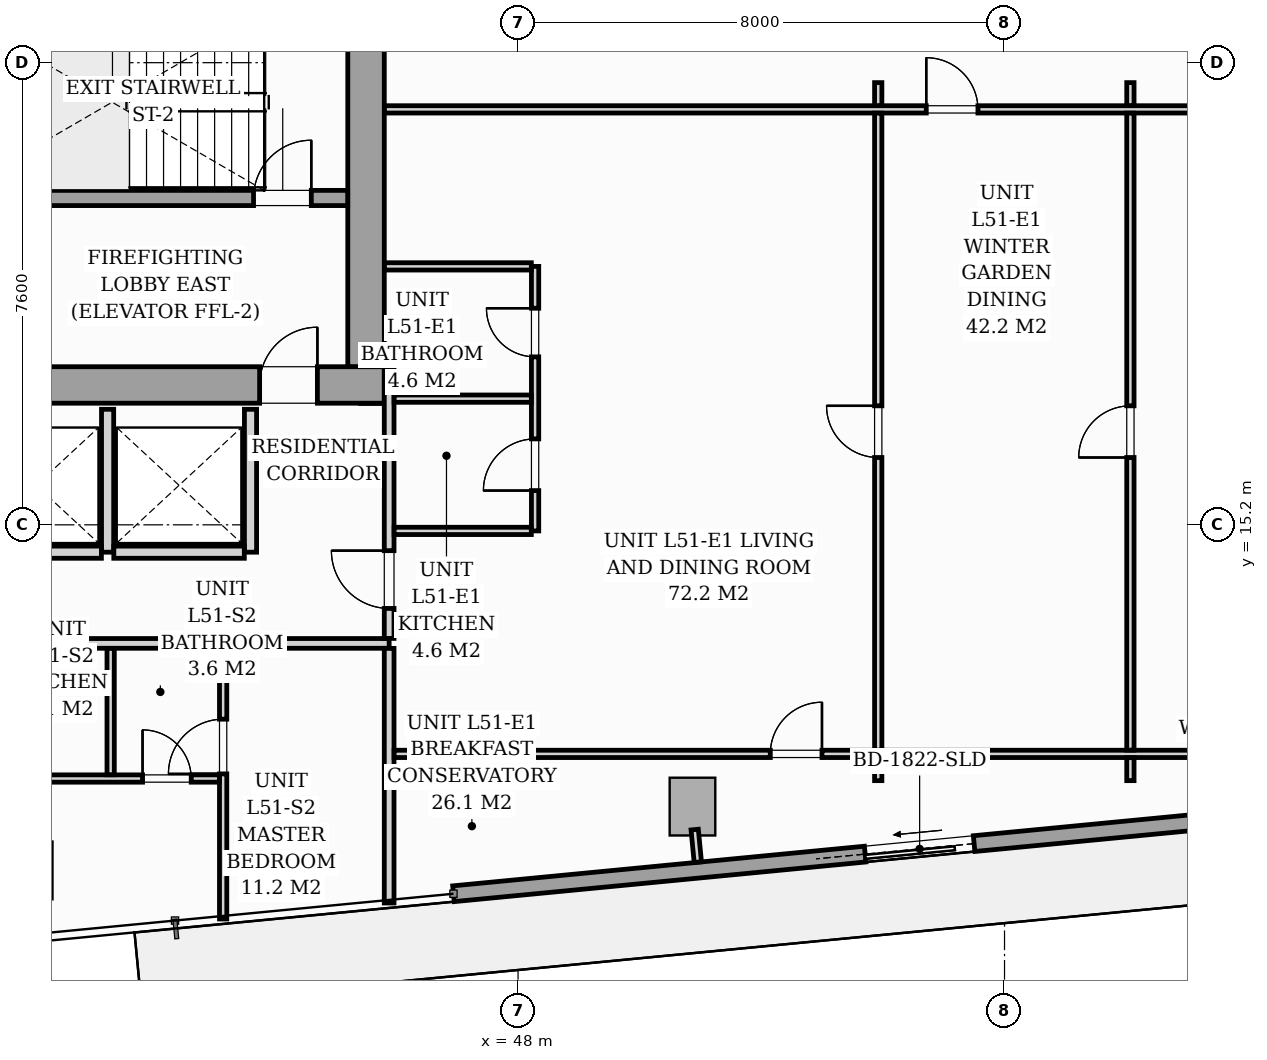
"""IFC4 building model, lengths in metres.
Left out: names, types, materials, properties, quantities, classifications, styles, units other than length and angle.
Written with IfcOpenShell. Run it as: python <this file> out.ifc"""

import sys

from ifc_helpers import new_model, si_unit, direction, frame, frame_2d, origin, origin_2d, place, context, subcontext, project, spatial, rectangle, i_section, extrude, source, transform, mapped, element, fill, save


model = new_model("IFC4")
c1 = context("Model", 3, precision=1e-05, world=origin(), true_north=direction((0.0, 1.0)))
c2 = subcontext(c1, "Body", "Model", "MODEL_VIEW")
j1 = project(units=[si_unit("LENGTHUNIT", "METRE"), si_unit("PLANEANGLEUNIT", "RADIAN")], contexts=[c1])
p1 = place(None, origin())
s1 = spatial("IfcSite", under=j1, at=p1, CompositionType="ELEMENT")
p2 = place(p1, origin())
s2 = spatial("IfcBuilding", under=s1, at=p2, CompositionType="ELEMENT")
p3 = place(p2, frame((0.0, 0.0, 179.4)))
s3 = spatial("IfcBuildingStorey", under=s2, at=p3, CompositionType="ELEMENT", Elevation=179.4)
m1 = source(origin(), c2, "Body", "SweptSolid", [
    extrude(i_section(OverallWidth=0.416, OverallDepth=0.446, WebThickness=0.039, FlangeThickness=0.063, FilletRadius=0.018, at=origin_2d()), origin(), (0.0, 0.0, 1.0), 3.196),
])
p4 = place(p3, frame((45.6, 17.4, 0.002), z_axis=(0.0, 0.0, 1.0), x_axis=(1.0, 0.0, 0.0)))
e1 = element("IfcColumn", 1, at=p4, inside=s3, PredefinedType="PILASTER", context=c2, shape_type="MappedRepresentation", body=[
    mapped(m1, transform((0.0, 0.0, 0.0), scale=1.0)),
])
m2 = source(origin(), c2, "Body", "SweptSolid", [
    extrude(rectangle(XDim=0.75, YDim=0.95, at=origin_2d()), origin(), (0.0, 0.0, 1.0), 3.196),
])
for number, where, z_axis, x_axis in (
    (2, (39.969, 9.517, 0.002), (0.0, 0.0, 1.0), (0.995, 0.096, 0.0)),
    (3, (50.868, 10.566, 0.002), (0.0, 0.0, 1.0), (0.995, 0.096, 0.0)),
):
    element("IfcColumn", number, at=place(p3, frame(where, z_axis=z_axis, x_axis=x_axis)), inside=s3, PredefinedType="COLUMN", context=c2, shape_type="MappedRepresentation", body=[
        mapped(m2, transform((0.0, 0.0, 0.0), scale=1.0)),
    ])
p5 = place(p3, frame((62.963, 10.676, 0.0), z_axis=(0.0, 0.0, 1.0), x_axis=(-0.995395627913, -0.095851676732, 0.0)))
e4 = element("IfcWall", 4, at=p5, inside=s3, PredefinedType="STANDARD", context=c2, shape_type="SweptSolid", body=[
    extrude(rectangle(XDim=16.1, YDim=0.26, at=frame_2d((8.05, 0.0))), origin(), (0.0, 0.0, 1.0), 2.94),
])
p6 = place(p5, frame((7.498, 0.0, 0.0)))
e5 = element("IfcOpeningElement", 5, at=p6, cuts=e4, PredefinedType="OPENING", context=c2, shape_type="SweptSolid", body=[
    extrude(rectangle(XDim=1.8, YDim=2.06, at=frame_2d((0.9, 1.03))), frame((0.0, 0.14, 0.0), z_axis=(0.0, -1.0, 0.0), x_axis=(1.0, 0.0, 0.0)), (0.0, 0.0, 1.0), 0.28),
])
p7 = place(p5, frame((2.05, 0.0, 0.65)))
e6 = element("IfcOpeningElement", 6, at=p7, cuts=e4, PredefinedType="OPENING", context=c2, shape_type="SweptSolid", body=[
    extrude(rectangle(XDim=1.6, YDim=1.5, at=frame_2d((0.8, 0.75))), frame((0.0, 0.14, 0.0), z_axis=(0.0, -1.0, 0.0), x_axis=(1.0, 0.0, 0.0)), (0.0, 0.0, 1.0), 0.28),
])
p8 = place(p3, frame((26.2, 17.5, 0.0), z_axis=(0.0, 0.0, 1.0), x_axis=(1.0, 0.0, 0.0)))
e7 = element("IfcWall", 7, at=p8, inside=s3, PredefinedType="SHEAR", context=c2, shape_type="SweptSolid", body=[
    extrude(rectangle(XDim=19.6, YDim=0.6, at=frame_2d((9.8, 0.0))), origin(), (0.0, 0.0, 1.0), 3.2),
])
p9 = place(p8, frame((0.95, 0.0, 0.0)))
e8 = element("IfcOpeningElement", 8, at=p9, cuts=e7, PredefinedType="OPENING", context=c2, shape_type="SweptSolid", body=[
    extrude(rectangle(XDim=0.95, YDim=2.06, at=frame_2d((0.475, 1.03))), frame((0.0, 0.31, 0.0), z_axis=(0.0, -1.0, 0.0), x_axis=(1.0, 0.0, 0.0)), (0.0, 0.0, 1.0), 0.62),
])
p10 = place(p8, frame((9.38, 0.0, 0.0)))
e9 = element("IfcOpeningElement", 9, at=p10, cuts=e7, PredefinedType="OPENING", context=c2, shape_type="SweptSolid", body=[
    extrude(rectangle(XDim=0.85, YDim=2.0, at=frame_2d((0.425, 1.0))), frame((0.0, 0.31, 0.0), z_axis=(0.0, -1.0, 0.0), x_axis=(1.0, 0.0, 0.0)), (0.0, 0.0, 1.0), 0.62),
])
p11 = place(p8, frame((17.55, 0.0, 0.0)))
e10 = element("IfcOpeningElement", 10, at=p11, cuts=e7, PredefinedType="OPENING", context=c2, shape_type="SweptSolid", body=[
    extrude(rectangle(XDim=0.95, YDim=2.06, at=frame_2d((0.475, 1.03))), frame((0.0, 0.31, 0.0), z_axis=(0.0, -1.0, 0.0), x_axis=(1.0, 0.0, 0.0)), (0.0, 0.0, 1.0), 0.62),
])
p12 = place(p3, frame((45.5, 17.802, 0.0), z_axis=(0.0, 0.0, 1.0), x_axis=(0.0, 1.0, 0.0)))
e11 = element("IfcWall", 11, at=p12, inside=s3, PredefinedType="SHEAR", context=c2, shape_type="SweptSolid", body=[
    extrude(rectangle(XDim=5.796, YDim=0.6, at=frame_2d((2.898, 0.0))), origin(), (0.0, 0.0, 1.0), 3.2),
])
p13 = place(p3, frame((37.05, 20.575, 0.0), z_axis=(0.0, 0.0, 1.0), x_axis=(1.0, 0.0, 0.0)))
e12 = element("IfcWall", 12, at=p13, inside=s3, PredefinedType="SOLIDWALL", context=c2, shape_type="SweptSolid", body=[
    extrude(rectangle(XDim=8.148, YDim=0.25, at=frame_2d((4.074, 0.0))), origin(), (0.0, 0.0, 1.0), 3.2),
])
p14 = place(p13, frame((6.6, 0.0, 0.0)))
e13 = element("IfcOpeningElement", 13, at=p14, cuts=e12, PredefinedType="OPENING", context=c2, shape_type="SweptSolid", body=[
    extrude(rectangle(XDim=0.95, YDim=2.06, at=frame_2d((0.475, 1.03))), frame((0.0, 0.135, 0.0), z_axis=(0.0, -1.0, 0.0), x_axis=(1.0, 0.0, 0.0)), (0.0, 0.0, 1.0), 0.27),
])
for number, where, z_axis, x_axis in (
    (14, (41.25, 14.75, 0.0), (0.0, 0.0, 1.0), (0.0, 1.0, 0.0)),
    (15, (43.6, 14.75, 0.0), (0.0, 0.0, 1.0), (0.0, 1.0, 0.0)),
):
    element("IfcWall", number, at=place(p3, frame(where, z_axis=z_axis, x_axis=x_axis)), inside=s3, PredefinedType="PARTITIONING", context=c2, shape_type="SweptSolid", body=[
        extrude(rectangle(XDim=2.35, YDim=0.2, at=frame_2d((1.175, 0.0))), origin(), (0.0, 0.0, 1.0), 2.94),
    ])
for number, where, z_axis, x_axis in (
    (16, (39.002, 14.75, 0.0), (0.0, 0.0, 1.0), (1.0, 0.0, 0.0)),
    (17, (41.352, 14.75, 0.0), (0.0, 0.0, 1.0), (1.0, 0.0, 0.0)),
):
    element("IfcWall", number, at=place(p3, frame(where, z_axis=z_axis, x_axis=x_axis)), inside=s3, PredefinedType="PARTITIONING", context=c2, shape_type="SweptSolid", body=[
        extrude(rectangle(XDim=2.146, YDim=0.2, at=frame_2d((1.073, 0.0))), origin(), (0.0, 0.0, 1.0), 2.94),
    ])
p15 = place(p3, frame((22.6, 13.25, 0.0), z_axis=(0.0, 0.0, 1.0), x_axis=(1.0, 0.0, 0.0)))
e18 = element("IfcWall", 18, at=p15, inside=s3, PredefinedType="PARTITIONING", context=c2, shape_type="SweptSolid", body=[
    extrude(rectangle(XDim=23.28, YDim=0.16, at=frame_2d((11.64, 0.0))), origin(), (0.0, 0.0, 1.0), 2.94),
])
p16 = place(p15, frame((3.335, 0.0, 0.0)))
e19 = element("IfcOpeningElement", 19, at=p16, cuts=e18, PredefinedType="OPENING", context=c2, shape_type="SweptSolid", body=[
    extrude(rectangle(XDim=0.95, YDim=2.06, at=frame_2d((0.475, 1.03))), frame((0.0, 0.09, 0.0), z_axis=(0.0, -1.0, 0.0), x_axis=(1.0, 0.0, 0.0)), (0.0, 0.0, 1.0), 0.18),
])
p17 = place(p15, frame((15.096, 0.0, 0.0)))
e20 = element("IfcOpeningElement", 20, at=p17, cuts=e18, PredefinedType="OPENING", context=c2, shape_type="SweptSolid", body=[
    extrude(rectangle(XDim=0.95, YDim=2.06, at=frame_2d((0.475, 1.03))), frame((0.0, 0.09, 0.0), z_axis=(0.0, -1.0, 0.0), x_axis=(1.0, 0.0, 0.0)), (0.0, 0.0, 1.0), 0.18),
])
p18 = place(p3, frame((45.88, 8.981, 0.0), z_axis=(0.0, 0.0, 1.0), x_axis=(0.0, 1.0, 0.0)))
e21 = element("IfcWall", 21, at=p18, inside=s3, PredefinedType="PARTITIONING", context=c2, shape_type="SweptSolid", body=[
    extrude(rectangle(XDim=4.187, YDim=0.16, at=frame_2d((2.094, 0.0))), origin(), (0.0, 0.0, 1.0), 2.94),
])
p19 = place(p3, frame((45.88, 13.332, 0.0), z_axis=(0.0, 0.0, 1.0), x_axis=(0.0, 1.0, 0.0)))
e22 = element("IfcWall", 22, at=p19, inside=s3, PredefinedType="PARTITIONING", context=c2, shape_type="SweptSolid", body=[
    extrude(rectangle(XDim=4.47, YDim=0.16, at=frame_2d((2.235, 0.0))), origin(), (0.0, 0.0, 1.0), 2.94),
])
p20 = place(p19, frame((0.493, 0.0, 0.0)))
e23 = element("IfcOpeningElement", 23, at=p20, cuts=e22, PredefinedType="OPENING", context=c2, shape_type="SweptSolid", body=[
    extrude(rectangle(XDim=0.95, YDim=2.06, at=frame_2d((0.475, 1.03))), frame((0.0, 0.09, 0.0), z_axis=(0.0, -1.0, 0.0), x_axis=(1.0, 0.0, 0.0)), (0.0, 0.0, 1.0), 0.18),
])
p21 = place(p3, frame((43.15, 8.718, 0.0), z_axis=(0.0, 0.0, 1.0), x_axis=(0.0, 1.0, 0.0)))
e24 = element("IfcWall", 24, at=p21, inside=s3, PredefinedType="PARTITIONING", context=c2, shape_type="SweptSolid", body=[
    extrude(rectangle(XDim=4.45, YDim=0.12, at=frame_2d((2.225, 0.0))), origin(), (0.0, 0.0, 1.0), 2.94),
])
p22 = place(p21, frame((2.386, 0.0, 0.0)))
e25 = element("IfcOpeningElement", 25, at=p22, cuts=e24, PredefinedType="OPENING", context=c2, shape_type="SweptSolid", body=[
    extrude(rectangle(XDim=0.9, YDim=2.05, at=frame_2d((0.45, 1.025))), frame((0.0, 0.07, 0.0), z_axis=(0.0, -1.0, 0.0), x_axis=(1.0, 0.0, 0.0)), (0.0, 0.0, 1.0), 0.14),
])
p23 = place(p3, frame((39.2, 11.028, 0.0), z_axis=(0.0, 0.0, 1.0), x_axis=(1.0, 0.0, 0.0)))
e26 = element("IfcWall", 26, at=p23, inside=s3, PredefinedType="PARTITIONING", context=c2, shape_type="SweptSolid", body=[
    extrude(rectangle(XDim=3.888, YDim=0.12, at=frame_2d((1.944, 0.0))), origin(), (0.0, 0.0, 1.0), 2.94),
])
p24 = place(p23, frame((2.625, 0.0, 0.0)))
e27 = element("IfcOpeningElement", 27, at=p24, cuts=e26, PredefinedType="OPENING", context=c2, shape_type="SweptSolid", body=[
    extrude(rectangle(XDim=0.8, YDim=2.02, at=frame_2d((0.4, 1.01))), frame((0.0, 0.07, 0.0), z_axis=(0.0, -1.0, 0.0), x_axis=(1.0, 0.0, 0.0)), (0.0, 0.0, 1.0), 0.14),
])
p25 = place(p3, frame((41.3, 11.09, 0.0), z_axis=(0.0, 0.0, 1.0), x_axis=(0.0, 1.0, 0.0)))
e28 = element("IfcWall", 28, at=p25, inside=s3, PredefinedType="PARTITIONING", context=c2, shape_type="SweptSolid", body=[
    extrude(rectangle(XDim=2.078, YDim=0.12, at=frame_2d((1.039, 0.0))), origin(), (0.0, 0.0, 1.0), 2.94),
])
p26 = place(p3, frame((48.28, 15.1, 0.0), z_axis=(0.0, 0.0, 1.0), x_axis=(0.0, 1.0, 0.0)))
e29 = element("IfcWall", 29, at=p26, inside=s3, PredefinedType="PARTITIONING", context=c2, shape_type="SweptSolid", body=[
    extrude(rectangle(XDim=4.35, YDim=0.12, at=frame_2d((2.175, 0.0))), origin(), (0.0, 0.0, 1.0), 2.94),
])
p27 = place(p26, frame((0.663, 0.0, 0.0)))
e30 = element("IfcOpeningElement", 30, at=p27, cuts=e29, PredefinedType="OPENING", context=c2, shape_type="SweptSolid", body=[
    extrude(rectangle(XDim=0.85, YDim=2.05, at=frame_2d((0.425, 1.025))), frame((0.0, 0.07, 0.0), z_axis=(0.0, -1.0, 0.0), x_axis=(1.0, 0.0, 0.0)), (0.0, 0.0, 1.0), 0.14),
])
p28 = place(p26, frame((2.862, 0.0, 0.0)))
e31 = element("IfcOpeningElement", 31, at=p28, cuts=e29, PredefinedType="OPENING", context=c2, shape_type="SweptSolid", body=[
    extrude(rectangle(XDim=0.8, YDim=2.02, at=frame_2d((0.4, 1.01))), frame((0.0, 0.07, 0.0), z_axis=(0.0, -1.0, 0.0), x_axis=(1.0, 0.0, 0.0)), (0.0, 0.0, 1.0), 0.14),
])
for number, where, z_axis, x_axis in (
    (32, (45.962, 17.275, 0.0), (0.0, 0.0, 1.0), (1.0, 0.0, 0.0)),
    (33, (45.962, 15.1, 0.0), (0.0, 0.0, 1.0), (1.0, 0.0, 0.0)),
):
    element("IfcWall", number, at=place(p3, frame(where, z_axis=z_axis, x_axis=x_axis)), inside=s3, PredefinedType="PARTITIONING", context=c2, shape_type="SweptSolid", body=[
        extrude(rectangle(XDim=2.256, YDim=0.12, at=frame_2d((1.128, 0.0))), origin(), (0.0, 0.0, 1.0), 2.94),
    ])
p29 = place(p3, frame((45.802, 19.45, 0.0), z_axis=(0.0, 0.0, 1.0), x_axis=(1.0, 0.0, 0.0)))
e34 = element("IfcWall", 34, at=p29, inside=s3, PredefinedType="PARTITIONING", context=c2, shape_type="SweptSolid", body=[
    extrude(rectangle(XDim=2.416, YDim=0.12, at=frame_2d((1.208, 0.0))), origin(), (0.0, 0.0, 1.0), 2.94),
])
p30 = place(p3, frame((45.802, 22.032, 0.0), z_axis=(0.0, 0.0, 1.0), x_axis=(1.0, 0.0, 0.0)))
e35 = element("IfcWall", 35, at=p30, inside=s3, PredefinedType="PARTITIONING", context=c2, shape_type="SweptSolid", body=[
    extrude(rectangle(XDim=18.499, YDim=0.12, at=frame_2d((9.25, 0.0))), origin(), (0.0, 0.0, 1.0), 2.94),
])
p31 = place(p30, frame((8.911, 0.0, 0.0)))
e36 = element("IfcOpeningElement", 36, at=p31, cuts=e35, PredefinedType="OPENING", context=c2, shape_type="SweptSolid", body=[
    extrude(rectangle(XDim=0.85, YDim=2.05, at=frame_2d((0.425, 1.025))), frame((0.0, 0.07, 0.0), z_axis=(0.0, -1.0, 0.0), x_axis=(1.0, 0.0, 0.0)), (0.0, 0.0, 1.0), 0.14),
])
p32 = place(p3, frame((45.962, 11.433, 0.0), z_axis=(0.0, 0.0, 1.0), x_axis=(1.0, 0.0, 0.0)))
e37 = element("IfcWall", 37, at=p32, inside=s3, PredefinedType="PARTITIONING", context=c2, shape_type="SweptSolid", body=[
    extrude(rectangle(XDim=16.666, YDim=0.12, at=frame_2d((8.333, 0.0))), origin(), (0.0, 0.0, 1.0), 2.383),
])
p33 = place(p32, frame((6.186, 0.0, 0.0)))
e38 = element("IfcOpeningElement", 38, at=p33, cuts=e37, PredefinedType="OPENING", context=c2, shape_type="SweptSolid", body=[
    extrude(rectangle(XDim=0.85, YDim=2.05, at=frame_2d((0.425, 1.025))), frame((0.0, 0.07, 0.0), z_axis=(0.0, -1.0, 0.0), x_axis=(1.0, 0.0, 0.0)), (0.0, 0.0, 1.0), 0.14),
])
p34 = place(p3, frame((58.07, 10.993, 0.0), z_axis=(0.0, 0.0, 1.0), x_axis=(0.0, 1.0, 0.0)))
e39 = element("IfcWall", 39, at=p34, inside=s3, PredefinedType="PARTITIONING", context=c2, shape_type="SweptSolid", body=[
    extrude(rectangle(XDim=0.378, YDim=0.12, at=frame_2d((0.189, 0.0))), origin(), (0.0, 0.0, 1.0), 2.94),
])
p35 = place(p3, frame((58.07, 11.495, 0.0), z_axis=(0.0, 0.0, 1.0), x_axis=(0.0, 1.0, 0.0)))
e40 = element("IfcWall", 40, at=p35, inside=s3, PredefinedType="PARTITIONING", context=c2, shape_type="SweptSolid", body=[
    extrude(rectangle(XDim=10.475, YDim=0.12, at=frame_2d((5.237, 0.0))), origin(), (0.0, 0.0, 1.0), 2.94),
])
p36 = place(p35, frame((4.812, 0.0, 0.0)))
e41 = element("IfcOpeningElement", 41, at=p36, cuts=e40, PredefinedType="OPENING", context=c2, shape_type="SweptSolid", body=[
    extrude(rectangle(XDim=0.85, YDim=2.05, at=frame_2d((0.425, 1.025))), frame((0.0, 0.07, 0.0), z_axis=(0.0, -1.0, 0.0), x_axis=(1.0, 0.0, 0.0)), (0.0, 0.0, 1.0), 0.14),
])
p37 = place(p3, frame((58.07, 22.094, 0.0), z_axis=(0.0, 0.0, 1.0), x_axis=(0.0, 1.0, 0.0)))
e42 = element("IfcWall", 42, at=p37, inside=s3, PredefinedType="PARTITIONING", context=c2, shape_type="SweptSolid", body=[
    extrude(rectangle(XDim=0.378, YDim=0.12, at=frame_2d((0.189, 0.0))), origin(), (0.0, 0.0, 1.0), 2.94),
])
p38 = place(p3, frame((53.923, 10.993, 0.0), z_axis=(0.0, 0.0, 1.0), x_axis=(0.0, 1.0, 0.0)))
e43 = element("IfcWall", 43, at=p38, inside=s3, PredefinedType="PARTITIONING", context=c2, shape_type="SweptSolid", body=[
    extrude(rectangle(XDim=0.378, YDim=0.12, at=frame_2d((0.189, 0.0))), origin(), (0.0, 0.0, 1.0), 2.94),
])
p39 = place(p3, frame((53.923, 11.495, 0.0), z_axis=(0.0, 0.0, 1.0), x_axis=(0.0, 1.0, 0.0)))
e44 = element("IfcWall", 44, at=p39, inside=s3, PredefinedType="PARTITIONING", context=c2, shape_type="SweptSolid", body=[
    extrude(rectangle(XDim=10.475, YDim=0.12, at=frame_2d((5.237, 0.0))), origin(), (0.0, 0.0, 1.0), 2.94),
])
p40 = place(p39, frame((4.812, 0.0, 0.0)))
e45 = element("IfcOpeningElement", 45, at=p40, cuts=e44, PredefinedType="OPENING", context=c2, shape_type="SweptSolid", body=[
    extrude(rectangle(XDim=0.85, YDim=2.05, at=frame_2d((0.425, 1.025))), frame((0.0, 0.07, 0.0), z_axis=(0.0, -1.0, 0.0), x_axis=(1.0, 0.0, 0.0)), (0.0, 0.0, 1.0), 0.14),
])
p41 = place(p3, frame((53.923, 22.094, 0.0), z_axis=(0.0, 0.0, 1.0), x_axis=(0.0, 1.0, 0.0)))
e46 = element("IfcWall", 46, at=p41, inside=s3, PredefinedType="PARTITIONING", context=c2, shape_type="SweptSolid", body=[
    extrude(rectangle(XDim=0.378, YDim=0.12, at=frame_2d((0.189, 0.0))), origin(), (0.0, 0.0, 1.0), 2.94),
])
p42 = place(p3, frame((50.905, 10.188, 0.0), z_axis=(0.0, 0.0, 1.0), x_axis=(0.095772948675, -0.995403205893, 0.0)))
e47 = element("IfcWall", 47, at=p42, inside=s3, PredefinedType="PARTITIONING", context=c2, shape_type="SweptSolid", body=[
    extrude(rectangle(XDim=0.538, YDim=0.12, at=frame_2d((0.269, 0.0))), origin(), (0.0, 0.0, 1.0), 2.94),
])
m3 = source(origin(), c2, "Body", "SweptSolid", [
    extrude(rectangle(XDim=1.8, YDim=2.06, at=frame_2d((0.9, 1.03))), frame((0.0, 0.025, 0.0), z_axis=(0.0, -1.0, 0.0), x_axis=(1.0, 0.0, 0.0)), (0.0, 0.0, 1.0), 0.05),
])
p43 = place(p6, origin())
e48 = element("IfcDoor", 48, at=p43, inside=s3, OperationType="SLIDING_TO_RIGHT", PredefinedType="DOOR", context=c2, shape_type="MappedRepresentation", body=[
    mapped(m3, transform((0.0, 0.0, 0.0), scale=1.0)),
])
fill(e5, e48)
m4 = source(origin(), c2, "Body", "SweptSolid", [
    extrude(rectangle(XDim=0.95, YDim=2.06, at=frame_2d((0.475, 1.03))), frame((0.0, 0.025, 0.0), z_axis=(0.0, -1.0, 0.0), x_axis=(1.0, 0.0, 0.0)), (0.0, 0.0, 1.0), 0.05),
])
p44 = place(p11, origin())
e49 = element("IfcDoor", 49, at=p44, inside=s3, OperationType="SINGLE_SWING_RIGHT", PredefinedType="DOOR", context=c2, shape_type="MappedRepresentation", body=[
    mapped(m4, transform((0.0, 0.0, 0.0), scale=1.0)),
])
fill(e10, e49)
p45 = place(p14, origin())
e50 = element("IfcDoor", 50, at=p45, inside=s3, OperationType="SINGLE_SWING_RIGHT", PredefinedType="DOOR", context=c2, shape_type="MappedRepresentation", body=[
    mapped(m4, transform((0.0, 0.0, 0.0), scale=1.0)),
])
fill(e13, e50)
m5 = source(origin(), c2, "Body", "SweptSolid", [
    extrude(rectangle(XDim=0.9, YDim=2.05, at=frame_2d((0.45, 1.025))), frame((0.0, 0.025, 0.0), z_axis=(0.0, -1.0, 0.0), x_axis=(1.0, 0.0, 0.0)), (0.0, 0.0, 1.0), 0.05),
])
p46 = place(p22, origin())
e51 = element("IfcDoor", 51, at=p46, inside=s3, OperationType="SINGLE_SWING_LEFT", PredefinedType="DOOR", context=c2, shape_type="MappedRepresentation", body=[
    mapped(m5, transform((0.0, 0.0, 0.0), scale=1.0)),
])
fill(e25, e51)
m6 = source(origin(), c2, "Body", "SweptSolid", [
    extrude(rectangle(XDim=0.8, YDim=2.02, at=frame_2d((0.4, 1.01))), frame((0.0, 0.025, 0.0), z_axis=(0.0, -1.0, 0.0), x_axis=(1.0, 0.0, 0.0)), (0.0, 0.0, 1.0), 0.05),
])
p47 = place(p24, origin())
e52 = element("IfcDoor", 52, at=p47, inside=s3, OperationType="SINGLE_SWING_LEFT", PredefinedType="DOOR", context=c2, shape_type="MappedRepresentation", body=[
    mapped(m6, transform((0.0, 0.0, 0.0), scale=1.0)),
])
fill(e27, e52)
m7 = source(origin(), c2, "Body", "SweptSolid", [
    extrude(rectangle(XDim=0.95, YDim=2.06, at=frame_2d((0.475, 1.03))), frame((0.0, 0.025, 0.0), z_axis=(0.0, -1.0, 0.0), x_axis=(1.0, 0.0, 0.0)), (0.0, 0.0, 1.0), 0.05),
])
p48 = place(p20, origin())
e53 = element("IfcDoor", 53, at=p48, inside=s3, OperationType="SINGLE_SWING_RIGHT", PredefinedType="DOOR", context=c2, shape_type="MappedRepresentation", body=[
    mapped(m7, transform((0.0, 0.0, 0.0), scale=1.0)),
])
fill(e23, e53)
m8 = source(origin(), c2, "Body", "SweptSolid", [
    extrude(rectangle(XDim=0.85, YDim=2.05, at=frame_2d((0.425, 1.025))), frame((0.0, 0.025, 0.0), z_axis=(0.0, -1.0, 0.0), x_axis=(1.0, 0.0, 0.0)), (0.0, 0.0, 1.0), 0.05),
])
p49 = place(p27, origin())
e54 = element("IfcDoor", 54, at=p49, inside=s3, OperationType="SINGLE_SWING_LEFT", PredefinedType="DOOR", context=c2, shape_type="MappedRepresentation", body=[
    mapped(m8, transform((0.0, 0.0, 0.0), scale=1.0)),
])
fill(e30, e54)
p50 = place(p28, origin())
e55 = element("IfcDoor", 55, at=p50, inside=s3, OperationType="SINGLE_SWING_RIGHT", PredefinedType="DOOR", context=c2, shape_type="MappedRepresentation", body=[
    mapped(m6, transform((0.0, 0.0, 0.0), scale=1.0)),
])
fill(e31, e55)
p51 = place(p31, origin())
e56 = element("IfcDoor", 56, at=p51, inside=s3, OperationType="SINGLE_SWING_LEFT", PredefinedType="DOOR", context=c2, shape_type="MappedRepresentation", body=[
    mapped(m8, transform((0.0, 0.0, 0.0), scale=1.0)),
])
fill(e36, e56)
p52 = place(p33, origin())
e57 = element("IfcDoor", 57, at=p52, inside=s3, OperationType="SINGLE_SWING_RIGHT", PredefinedType="DOOR", context=c2, shape_type="MappedRepresentation", body=[
    mapped(m8, transform((0.0, 0.0, 0.0), scale=1.0)),
])
fill(e38, e57)
p53 = place(p36, origin())
e58 = element("IfcDoor", 58, at=p53, inside=s3, OperationType="SINGLE_SWING_LEFT", PredefinedType="DOOR", context=c2, shape_type="MappedRepresentation", body=[
    mapped(m8, transform((0.0, 0.0, 0.0), scale=1.0)),
])
fill(e41, e58)
p54 = place(p40, origin())
e59 = element("IfcDoor", 59, at=p54, inside=s3, OperationType="SINGLE_SWING_RIGHT", PredefinedType="DOOR", context=c2, shape_type="MappedRepresentation", body=[
    mapped(m8, transform((0.0, 0.0, 0.0), scale=1.0)),
])
fill(e45, e59)
save(model, sys.argv[1])
